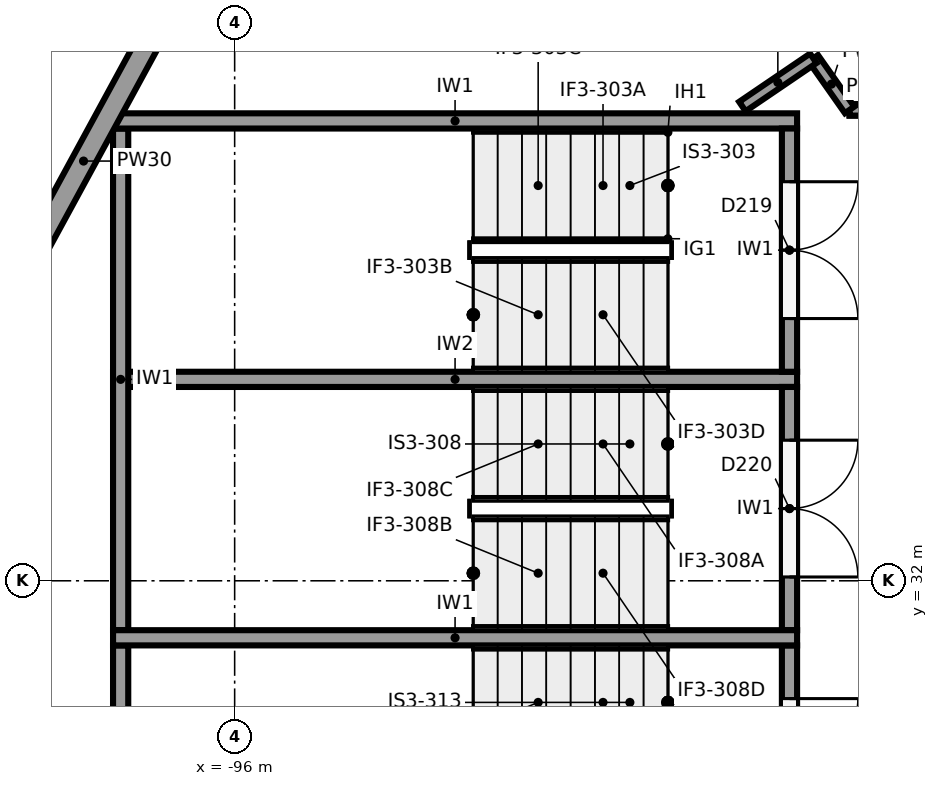
"""IFC4 building model, lengths in metres.
Left out: names, types, materials, properties, quantities, classifications, styles, units other than length and angle.
Written with IfcOpenShell. Run it as: python <this file> out.ifc"""

import sys

from ifc_helpers import new_model, si_unit, direction, frame, frame_2d, origin, place, context, subcontext, project, spatial, rectangle, extrude, element, fill, save


model = new_model("IFC4")
c1 = context("Model", 3, precision=1e-05, world=origin(), true_north=direction((0.0, 1.0)))
c2 = subcontext(c1, "Body", "Model", "MODEL_VIEW")
j1 = project(units=[si_unit("LENGTHUNIT", "METRE"), si_unit("PLANEANGLEUNIT", "RADIAN")], contexts=[c1])
p1 = place(None, origin())
s1 = spatial("IfcSite", under=j1, at=p1, CompositionType="ELEMENT")
p2 = place(p1, origin())
s2 = spatial("IfcBuilding", under=s1, at=p2, CompositionType="ELEMENT")
p3 = place(p2, frame((0.0, 0.0, 6.5)))
s3 = spatial("IfcBuildingStorey", under=s2, at=p3, CompositionType="ELEMENT", Elevation=6.5)
p4 = place(p3, frame((-101.161, 31.689, 0.0), z_axis=(0.0, 0.0, 1.0), x_axis=(0.477867771117, 0.878431780691, 0.0)))
e1 = element("IfcWall", 1, at=p4, inside=s3, PredefinedType="SOLIDWALL", context=c2, shape_type="SweptSolid", body=[
    extrude(rectangle(XDim=13.28, YDim=0.3, at=frame_2d((6.64, 0.0))), origin(), (0.0, 0.0, 1.0), 3.85),
])
p5 = place(p4, frame((9.03, 0.0, 0.0)))
e2 = element("IfcOpeningElement", 2, at=p5, cuts=e1, PredefinedType="OPENING", context=c2, shape_type="SweptSolid", body=[
    extrude(rectangle(XDim=1.8, YDim=2.4, at=frame_2d((0.9, 1.2))), frame((0.0, 0.16, 0.0), z_axis=(0.0, -1.0, 0.0), x_axis=(1.0, 0.0, 0.0)), (0.0, 0.0, 1.0), 0.32),
])
p6 = place(p3, frame((-94.815, 19.145, 0.0), z_axis=(0.0, 0.0, 1.0), x_axis=(-0.477867771117, 0.878431780691, 0.0)))
e3 = element("IfcWall", 3, at=p6, inside=s3, PredefinedType="SOLIDWALL", context=c2, shape_type="SweptSolid", body=[
    extrude(rectangle(XDim=13.28, YDim=0.3, at=frame_2d((6.64, 0.0))), origin(), (0.0, 0.0, 1.0), 3.85),
])
for number, where, z_axis, x_axis in (
    (4, (-97.6, 38.05, 0.0), (0.0, 0.0, 1.0), (1.0, 0.0, 0.0)),
    (5, (-97.6, 31.25, 0.0), (0.0, 0.0, 1.0), (1.0, 0.0, 0.0)),
):
    element("IfcWall", number, at=place(p3, frame(where, z_axis=z_axis, x_axis=x_axis)), inside=s3, PredefinedType="SHEAR", context=c2, shape_type="SweptSolid", body=[
        extrude(rectangle(XDim=9.0, YDim=0.2, at=frame_2d((4.5, 0.0))), origin(), (0.0, 0.0, 1.0), 5.15),
    ])
for number, where, z_axis, x_axis in (
    (6, (-97.5, 37.95, 0.0), (0.0, 0.0, 1.0), (0.0, -1.0, 0.0)),
    (7, (-97.5, 31.15, 0.0), (0.0, 0.0, 1.0), (0.0, -1.0, 0.0)),
):
    element("IfcWall", number, at=place(p3, frame(where, z_axis=z_axis, x_axis=x_axis)), inside=s3, PredefinedType="SHEAR", context=c2, shape_type="SweptSolid", body=[
        extrude(rectangle(XDim=6.6, YDim=0.2, at=frame_2d((3.3, 0.0))), origin(), (0.0, 0.0, 1.0), 5.15),
    ])
p7 = place(p3, frame((-97.6, 34.65, 0.0), z_axis=(0.0, 0.0, 1.0), x_axis=(1.0, 0.0, 0.0)))
e8 = element("IfcWall", 8, at=p7, inside=s3, PredefinedType="SHEAR", context=c2, shape_type="SweptSolid", body=[
    extrude(rectangle(XDim=9.0, YDim=0.2, at=frame_2d((4.5, 0.0))), origin(), (0.0, 0.0, 1.0), 5.15),
])
p8 = place(p3, frame((-88.7, 37.95, 0.0), z_axis=(0.0, 0.0, 1.0), x_axis=(0.0, -1.0, 0.0)))
e9 = element("IfcWall", 9, at=p8, inside=s3, PredefinedType="SHEAR", context=c2, shape_type="SweptSolid", body=[
    extrude(rectangle(XDim=3.2, YDim=0.2, at=frame_2d((1.6, 0.0))), origin(), (0.0, 0.0, 1.0), 5.15),
])
p9 = place(p8, frame((0.7, 0.0, 0.0)))
e10 = element("IfcOpeningElement", 10, at=p9, cuts=e9, PredefinedType="OPENING", context=c2, shape_type="SweptSolid", body=[
    extrude(rectangle(XDim=1.8, YDim=2.1, at=frame_2d((0.9, 1.05))), frame((0.0, 0.11, 0.0), z_axis=(0.0, -1.0, 0.0), x_axis=(1.0, 0.0, 0.0)), (0.0, 0.0, 1.0), 0.22),
])
p10 = place(p3, frame((-88.7, 34.55, 0.0), z_axis=(0.0, 0.0, 1.0), x_axis=(0.0, -1.0, 0.0)))
e11 = element("IfcWall", 11, at=p10, inside=s3, PredefinedType="SHEAR", context=c2, shape_type="SweptSolid", body=[
    extrude(rectangle(XDim=3.2, YDim=0.2, at=frame_2d((1.6, 0.0))), origin(), (0.0, 0.0, 1.0), 5.15),
])
p11 = place(p10, frame((0.7, 0.0, 0.0)))
e12 = element("IfcOpeningElement", 12, at=p11, cuts=e11, PredefinedType="OPENING", context=c2, shape_type="SweptSolid", body=[
    extrude(rectangle(XDim=1.8, YDim=2.1, at=frame_2d((0.9, 1.05))), frame((0.0, 0.11, 0.0), z_axis=(0.0, -1.0, 0.0), x_axis=(1.0, 0.0, 0.0)), (0.0, 0.0, 1.0), 0.22),
])
p12 = place(p3, frame((-88.7, 31.15, 0.0), z_axis=(0.0, 0.0, 1.0), x_axis=(0.0, -1.0, 0.0)))
e13 = element("IfcWall", 13, at=p12, inside=s3, PredefinedType="SHEAR", context=c2, shape_type="SweptSolid", body=[
    extrude(rectangle(XDim=3.2, YDim=0.2, at=frame_2d((1.6, 0.0))), origin(), (0.0, 0.0, 1.0), 5.15),
])
p13 = place(p12, frame((0.7, 0.0, 0.0)))
e14 = element("IfcOpeningElement", 14, at=p13, cuts=e13, PredefinedType="OPENING", context=c2, shape_type="SweptSolid", body=[
    extrude(rectangle(XDim=1.8, YDim=2.1, at=frame_2d((0.9, 1.05))), frame((0.0, 0.11, 0.0), z_axis=(0.0, -1.0, 0.0), x_axis=(1.0, 0.0, 0.0)), (0.0, 0.0, 1.0), 0.22),
])
p14 = place(p3, frame((-81.555, 38.195, 0.0), z_axis=(0.0, 0.0, 1.0), x_axis=(-1.0, 0.0, 0.0)))
e15 = element("IfcWall", 15, at=p14, inside=s3, PredefinedType="PARTITIONING", context=c2, shape_type="SweptSolid", body=[
    extrude(rectangle(XDim=6.354, YDim=0.15, at=frame_2d((3.177, 0.0))), origin(), (0.0, 0.0, 1.0), 3.85),
])
p15 = place(p14, frame((3.85, 0.0, 0.0)))
e16 = element("IfcOpeningElement", 16, at=p15, cuts=e15, PredefinedType="OPENING", context=c2, shape_type="SweptSolid", body=[
    extrude(rectangle(XDim=1.8, YDim=2.1, at=frame_2d((0.9, 1.05))), frame((0.0, 0.085, 0.0), z_axis=(0.0, -1.0, 0.0), x_axis=(1.0, 0.0, 0.0)), (0.0, 0.0, 1.0), 0.17),
])
p16 = place(p3, frame((-87.255, 38.195, 3.85), z_axis=(0.0, 0.0, 1.0), x_axis=(-1.0, 0.0, 0.0)))
e17 = element("IfcWall", 17, at=p16, inside=s3, PredefinedType="PARTITIONING", context=c2, shape_type="SweptSolid", body=[
    extrude(rectangle(XDim=0.654, YDim=0.15, at=frame_2d((0.327, 0.0))), origin(), (0.0, 0.0, 1.0), 1.3),
])
p17 = place(p3, frame((-87.909, 38.195, 0.0), z_axis=(0.0, 0.0, 1.0), x_axis=(-0.575573582652, 0.81774999294, 0.0)))
e18 = element("IfcWall", 18, at=p17, inside=s3, PredefinedType="PARTITIONING", context=c2, shape_type="SweptSolid", body=[
    extrude(rectangle(XDim=0.83, YDim=0.15, at=frame_2d((0.415, 0.0))), origin(), (0.0, 0.0, 1.0), 5.15),
])
p18 = place(p3, frame((-88.387, 38.874, 0.0), z_axis=(0.0, 0.0, 1.0), x_axis=(-0.827055308354, -0.562120553728, 0.0)))
e19 = element("IfcWall", 19, at=p18, inside=s3, PredefinedType="PARTITIONING", context=c2, shape_type="SweptSolid", body=[
    extrude(rectangle(XDim=1.128, YDim=0.15, at=frame_2d((0.564, 0.0))), origin(), (0.0, 0.0, 1.0), 5.15),
])
p19 = place(p9, origin())
e20 = element("IfcDoor", 20, at=p19, inside=s3, OperationType="DOUBLE_DOOR_SINGLE_SWING", PredefinedType="DOOR", context=c2, shape_type="SweptSolid", body=[
    extrude(rectangle(XDim=1.8, YDim=2.1, at=frame_2d((0.9, 1.05))), frame((0.0, 0.025, 0.0), z_axis=(0.0, -1.0, 0.0), x_axis=(1.0, 0.0, 0.0)), (0.0, 0.0, 1.0), 0.05),
])
fill(e10, e20)
p20 = place(p11, origin())
e21 = element("IfcDoor", 21, at=p20, inside=s3, OperationType="DOUBLE_DOOR_SINGLE_SWING", PredefinedType="DOOR", context=c2, shape_type="SweptSolid", body=[
    extrude(rectangle(XDim=1.8, YDim=2.1, at=frame_2d((0.9, 1.05))), frame((0.0, 0.025, 0.0), z_axis=(0.0, -1.0, 0.0), x_axis=(1.0, 0.0, 0.0)), (0.0, 0.0, 1.0), 0.05),
])
fill(e12, e21)
p21 = place(p13, origin())
e22 = element("IfcDoor", 22, at=p21, inside=s3, OperationType="DOUBLE_DOOR_SINGLE_SWING", PredefinedType="DOOR", context=c2, shape_type="SweptSolid", body=[
    extrude(rectangle(XDim=1.8, YDim=2.1, at=frame_2d((0.9, 1.05))), frame((0.0, 0.025, 0.0), z_axis=(0.0, -1.0, 0.0), x_axis=(1.0, 0.0, 0.0)), (0.0, 0.0, 1.0), 0.05),
])
fill(e14, e22)
save(model, sys.argv[1])
